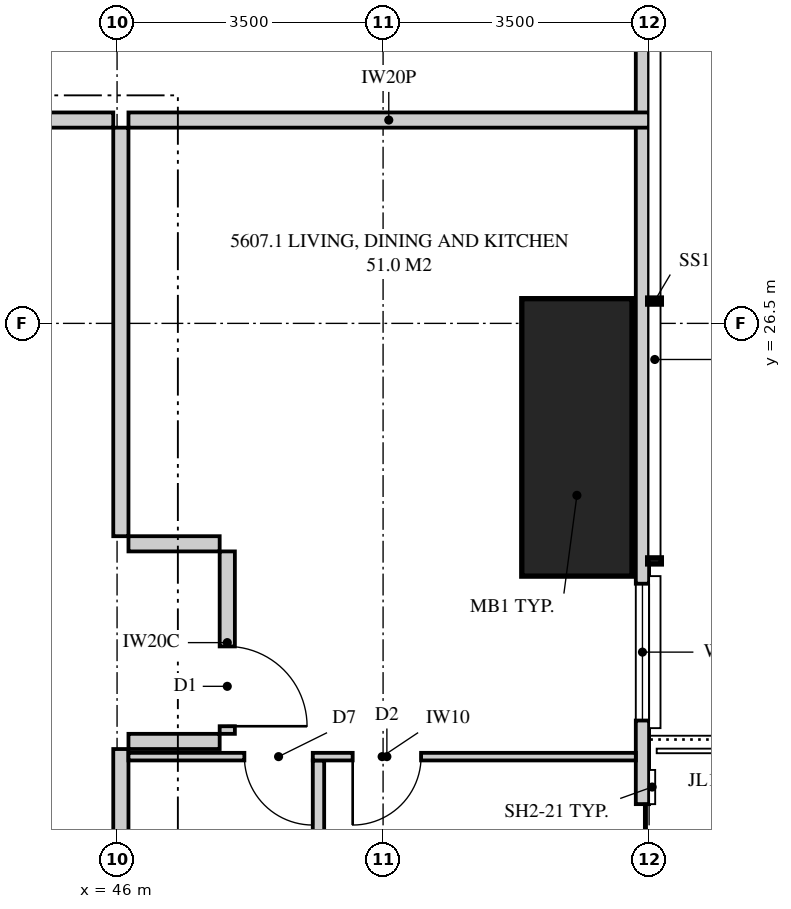
"""IFC4 building model, lengths in metres.
Left out: names, types, materials, properties, quantities, classifications, styles, units other than length and angle.
Written with IfcOpenShell. Run it as: python <this file> out.ifc"""

import sys

from ifc_helpers import new_model, si_unit, direction, frame, frame_2d, origin, origin_2d, place, context, subcontext, project, spatial, polyline, rectangle, outline, extrude, element, fill, save


model = new_model("IFC4")
c1 = context("Model", 3, precision=1e-05, world=origin(), true_north=direction((0.0, 1.0)))
c2 = subcontext(c1, "Body", "Model", "MODEL_VIEW")
j1 = project(units=[si_unit("LENGTHUNIT", "METRE"), si_unit("PLANEANGLEUNIT", "RADIAN")], contexts=[c1])
p1 = place(None, origin())
s1 = spatial("IfcSite", under=j1, at=p1, CompositionType="ELEMENT")
p2 = place(p1, origin())
s2 = spatial("IfcBuilding", under=s1, at=p2, CompositionType="ELEMENT")
p3 = place(p2, frame((0.0, 0.0, 204.6)))
s3 = spatial("IfcBuildingStorey", under=s2, at=p3, CompositionType="ELEMENT", Elevation=204.6)
p4 = place(p3, frame((52.05, 25.0, 0.0), z_axis=(0.0, 0.0, 1.0), x_axis=(1.0, 0.0, 0.0)))
e1 = element("IfcColumn", 1, at=p4, inside=s3, PredefinedType="COLUMN", context=c2, shape_type="SweptSolid", body=[
    extrude(rectangle(XDim=1.45, YDim=3.65, at=origin_2d()), origin(), (0.0, 0.0, 1.0), 3.35),
])
p5 = place(p3, frame((52.913, 3.051, 0.0), z_axis=(0.0, 0.0, 1.0), x_axis=(0.0, 1.0, 0.0)))
e2 = element("IfcWall", 2, at=p5, inside=s3, PredefinedType="SOLIDWALL", context=c2, shape_type="SweptSolid", body=[
    extrude(outline(polyline([(0.0, 0.0), (29.897, 0.0), (29.897, 3.07), (19.763, 3.07), (19.763, 3.01), (19.617, 3.07), (0.0, 3.07), (0.0, 0.0)])), frame((0.0, 0.087, 0.0), z_axis=(0.0, -1.0, 0.0), x_axis=(1.0, 0.0, 0.0)), (0.0, 0.0, 1.0), 0.175),
])
p6 = place(p5, frame((1.137, 0.0, 0.4)))
e3 = element("IfcOpeningElement", 3, at=p6, cuts=e2, PredefinedType="OPENING", context=c2, shape_type="SweptSolid", body=[
    extrude(rectangle(XDim=2.4, YDim=1.7, at=frame_2d((1.2, 0.85))), frame((0.0, 0.097, 0.0), z_axis=(0.0, -1.0, 0.0), x_axis=(1.0, 0.0, 0.0)), (0.0, 0.0, 1.0), 0.195),
])
p7 = place(p5, frame((5.571, 0.0, 0.4)))
e4 = element("IfcOpeningElement", 4, at=p7, cuts=e2, PredefinedType="OPENING", context=c2, shape_type="SweptSolid", body=[
    extrude(rectangle(XDim=2.4, YDim=1.7, at=frame_2d((1.2, 0.85))), frame((0.0, 0.097, 0.0), z_axis=(0.0, -1.0, 0.0), x_axis=(1.0, 0.0, 0.0)), (0.0, 0.0, 1.0), 0.195),
])
p8 = place(p5, frame((11.879, 0.0, 0.4)))
e5 = element("IfcOpeningElement", 5, at=p8, cuts=e2, PredefinedType="OPENING", context=c2, shape_type="SweptSolid", body=[
    extrude(rectangle(XDim=1.8, YDim=1.7, at=frame_2d((0.9, 0.85))), frame((0.0, 0.097, 0.0), z_axis=(0.0, -1.0, 0.0), x_axis=(1.0, 0.0, 0.0)), (0.0, 0.0, 1.0), 0.195),
])
p9 = place(p5, frame((15.324, 0.0, 0.0)))
e6 = element("IfcOpeningElement", 6, at=p9, cuts=e2, PredefinedType="OPENING", context=c2, shape_type="SweptSolid", body=[
    extrude(rectangle(XDim=1.8, YDim=2.1, at=frame_2d((0.9, 1.05))), frame((0.0, 0.097, 0.0), z_axis=(0.0, -1.0, 0.0), x_axis=(1.0, 0.0, 0.0)), (0.0, 0.0, 1.0), 0.195),
])
p10 = place(p5, frame((18.224, 0.0, 0.4)))
e7 = element("IfcOpeningElement", 7, at=p10, cuts=e2, PredefinedType="OPENING", context=c2, shape_type="SweptSolid", body=[
    extrude(rectangle(XDim=1.8, YDim=1.7, at=frame_2d((0.9, 0.85))), frame((0.0, 0.097, 0.0), z_axis=(0.0, -1.0, 0.0), x_axis=(1.0, 0.0, 0.0)), (0.0, 0.0, 1.0), 0.195),
])
p11 = place(p5, frame((27.461, 0.0, 0.4)))
e8 = element("IfcOpeningElement", 8, at=p11, cuts=e2, PredefinedType="OPENING", context=c2, shape_type="SweptSolid", body=[
    extrude(rectangle(XDim=1.2, YDim=1.7, at=frame_2d((0.6, 0.85))), frame((0.0, 0.097, 0.0), z_axis=(0.0, -1.0, 0.0), x_axis=(1.0, 0.0, 0.0)), (0.0, 0.0, 1.0), 0.195),
])
p12 = place(p3, frame((46.15, 29.175, 0.0), z_axis=(0.0, 0.0, 1.0), x_axis=(1.0, 0.0, 0.0)))
e9 = element("IfcWall", 9, at=p12, inside=s3, PredefinedType="PARTITIONING", context=c2, shape_type="SweptSolid", body=[
    extrude(outline(polyline([(0.0, 0.0), (6.85, 0.0), (6.85, 3.07), (5.748, 3.07), (5.748, 2.07), (4.702, 2.07), (4.702, 3.07), (0.0, 3.07), (0.0, 0.0)])), frame((0.0, 0.1, 0.0), z_axis=(0.0, -1.0, 0.0), x_axis=(1.0, 0.0, 0.0)), (0.0, 0.0, 1.0), 0.2),
])
p13 = place(p3, frame((46.05, 14.0, 0.0), z_axis=(0.0, 0.0, 1.0), x_axis=(0.0, 1.0, 0.0)))
e10 = element("IfcWall", 10, at=p13, inside=s3, PredefinedType="PARTITIONING", context=c2, shape_type="SweptSolid", body=[
    extrude(rectangle(XDim=6.9, YDim=0.2, at=frame_2d((3.45, 0.0))), origin(), (0.0, 0.0, 1.0), 3.07),
])
p14 = place(p3, frame((52.825, 20.8, 0.0), z_axis=(0.0, 0.0, 1.0), x_axis=(-1.0, 0.0, 0.0)))
e11 = element("IfcWall", 11, at=p14, inside=s3, PredefinedType="PARTITIONING", context=c2, shape_type="SweptSolid", body=[
    extrude(outline(polyline([(0.0, 0.0), (6.675, 0.0), (6.675, 3.07), (1.275, 3.07), (1.275, 2.07), (0.275, 2.07), (0.275, 3.07), (0.0, 3.07), (0.0, 0.0)])), frame((0.0, 0.05, 0.0), z_axis=(0.0, -1.0, 0.0), x_axis=(1.0, 0.0, 0.0)), (0.0, 0.0, 1.0), 0.1),
])
p15 = place(p14, frame((2.825, 0.0, 0.0)))
e12 = element("IfcOpeningElement", 12, at=p15, cuts=e11, PredefinedType="OPENING", context=c2, shape_type="SweptSolid", body=[
    extrude(rectangle(XDim=0.9, YDim=2.1, at=frame_2d((0.45, 1.05))), frame((0.0, 0.06, 0.0), z_axis=(0.0, -1.0, 0.0), x_axis=(1.0, 0.0, 0.0)), (0.0, 0.0, 1.0), 0.12),
])
p16 = place(p14, frame((4.25, 0.0, 0.0)))
e13 = element("IfcOpeningElement", 13, at=p16, cuts=e11, PredefinedType="OPENING", context=c2, shape_type="SweptSolid", body=[
    extrude(rectangle(XDim=0.9, YDim=2.1, at=frame_2d((0.45, 1.05))), frame((0.0, 0.06, 0.0), z_axis=(0.0, -1.0, 0.0), x_axis=(1.0, 0.0, 0.0)), (0.0, 0.0, 1.0), 0.12),
])
p17 = place(p3, frame((48.65, 17.25, 0.0), z_axis=(0.0, 0.0, 1.0), x_axis=(0.0, 1.0, 0.0)))
e14 = element("IfcWall", 14, at=p17, inside=s3, PredefinedType="PLUMBINGWALL", context=c2, shape_type="SweptSolid", body=[
    extrude(rectangle(XDim=3.5, YDim=0.15, at=frame_2d((1.75, 0.0))), origin(), (0.0, 0.0, 1.0), 3.07),
])
p18 = place(p3, frame((46.05, 23.7, 0.0), z_axis=(0.0, 0.0, 1.0), x_axis=(0.0, 1.0, 0.0)))
e15 = element("IfcWall", 15, at=p18, inside=s3, PredefinedType="PARTITIONING", context=c2, shape_type="SweptSolid", body=[
    extrude(outline(polyline([(0.0, 0.0), (5.375, 0.0), (5.375, 3.07), (1.512, 3.07), (1.512, 2.595), (1.088, 2.595), (1.088, 3.07), (0.0, 3.07), (0.0, 0.0)])), frame((0.0, 0.1, 0.0), z_axis=(0.0, -1.0, 0.0), x_axis=(1.0, 0.0, 0.0)), (0.0, 0.0, 1.0), 0.2),
])
p19 = place(p3, frame((47.45, 21.1, 0.0), z_axis=(0.0, 0.0, 1.0), x_axis=(0.0, 1.0, 0.0)))
e16 = element("IfcWall", 16, at=p19, inside=s3, PredefinedType="PARTITIONING", context=c2, shape_type="SweptSolid", body=[
    extrude(rectangle(XDim=2.4, YDim=0.2, at=frame_2d((1.2, 0.0))), origin(), (0.0, 0.0, 1.0), 3.07),
])
p20 = place(p19, frame((0.1, 0.0, 0.0)))
e17 = element("IfcOpeningElement", 17, at=p20, cuts=e16, PredefinedType="OPENING", context=c2, shape_type="SweptSolid", body=[
    extrude(rectangle(XDim=1.05, YDim=2.2, at=frame_2d((0.525, 1.1))), frame((0.0, 0.11, 0.0), z_axis=(0.0, -1.0, 0.0), x_axis=(1.0, 0.0, 0.0)), (0.0, 0.0, 1.0), 0.22),
])
for number, where, z_axis, x_axis in (
    (18, (46.15, 21.0, 0.0), (0.0, 0.0, 1.0), (1.0, 0.0, 0.0)),
    (19, (46.15, 23.6, 0.0), (0.0, 0.0, 1.0), (1.0, 0.0, 0.0)),
):
    element("IfcWall", number, at=place(p3, frame(where, z_axis=z_axis, x_axis=x_axis)), inside=s3, PredefinedType="PARTITIONING", context=c2, shape_type="SweptSolid", body=[
        extrude(rectangle(XDim=1.2, YDim=0.2, at=frame_2d((0.6, 0.0))), origin(), (0.0, 0.0, 1.0), 3.07),
    ])
p21 = place(p3, frame((42.325, 29.175, 0.0), z_axis=(0.0, 0.0, 1.0), x_axis=(1.0, 0.0, 0.0)))
e20 = element("IfcWall", 20, at=p21, inside=s3, PredefinedType="PARTITIONING", context=c2, shape_type="SweptSolid", body=[
    extrude(outline(polyline([(0.0, 0.0), (3.625, 0.0), (3.625, 3.07), (1.135, 3.07), (1.135, 2.47), (0.0, 2.47), (0.0, 3.07), (0.0, 0.0)])), frame((0.0, 0.1, 0.0), z_axis=(0.0, -1.0, 0.0), x_axis=(1.0, 0.0, 0.0)), (0.0, 0.0, 1.0), 0.2),
])
p22 = place(p9, origin())
e21 = element("IfcDoor", 21, at=p22, inside=s3, OperationType="SLIDING_TO_LEFT", PredefinedType="DOOR", context=c2, shape_type="SweptSolid", body=[
    extrude(rectangle(XDim=1.8, YDim=2.1, at=frame_2d((0.9, 1.05))), frame((0.0, 0.025, 0.0), z_axis=(0.0, -1.0, 0.0), x_axis=(1.0, 0.0, 0.0)), (0.0, 0.0, 1.0), 0.05),
])
fill(e6, e21)
p23 = place(p10, origin())
e22 = element("IfcWindow", 22, at=p23, inside=s3, PartitioningType="SINGLE_PANEL", PredefinedType="WINDOW", context=c2, shape_type="SweptSolid", body=[
    extrude(rectangle(XDim=1.8, YDim=1.7, at=frame_2d((0.9, 0.85))), frame((0.0, 0.03, 0.0), z_axis=(0.0, -1.0, 0.0), x_axis=(1.0, 0.0, 0.0)), (0.0, 0.0, 1.0), 0.06),
])
fill(e7, e22)
p24 = place(p20, frame((1.05, 0.0, 0.0), z_axis=(0.0, 0.0, 1.0), x_axis=(-1.0, 0.0, 0.0)))
e23 = element("IfcDoor", 23, at=p24, inside=s3, OperationType="SINGLE_SWING_RIGHT", PredefinedType="DOOR", context=c2, shape_type="SweptSolid", body=[
    extrude(rectangle(XDim=1.05, YDim=2.2, at=frame_2d((0.525, 1.1))), frame((0.0, 0.025, 0.0), z_axis=(0.0, -1.0, 0.0), x_axis=(1.0, 0.0, 0.0)), (0.0, 0.0, 1.0), 0.05),
])
fill(e17, e23)
p25 = place(p15, origin())
e24 = element("IfcDoor", 24, at=p25, inside=s3, OperationType="SINGLE_SWING_RIGHT", PredefinedType="DOOR", context=c2, shape_type="SweptSolid", body=[
    extrude(rectangle(XDim=0.9, YDim=2.1, at=frame_2d((0.45, 1.05))), frame((0.0, 0.025, 0.0), z_axis=(0.0, -1.0, 0.0), x_axis=(1.0, 0.0, 0.0)), (0.0, 0.0, 1.0), 0.05),
])
fill(e12, e24)
p26 = place(p16, origin())
e25 = element("IfcDoor", 25, at=p26, inside=s3, OperationType="SINGLE_SWING_LEFT", PredefinedType="DOOR", context=c2, shape_type="SweptSolid", body=[
    extrude(rectangle(XDim=0.9, YDim=2.1, at=frame_2d((0.45, 1.05))), frame((0.0, 0.025, 0.0), z_axis=(0.0, -1.0, 0.0), x_axis=(1.0, 0.0, 0.0)), (0.0, 0.0, 1.0), 0.05),
])
fill(e13, e25)
save(model, sys.argv[1])
